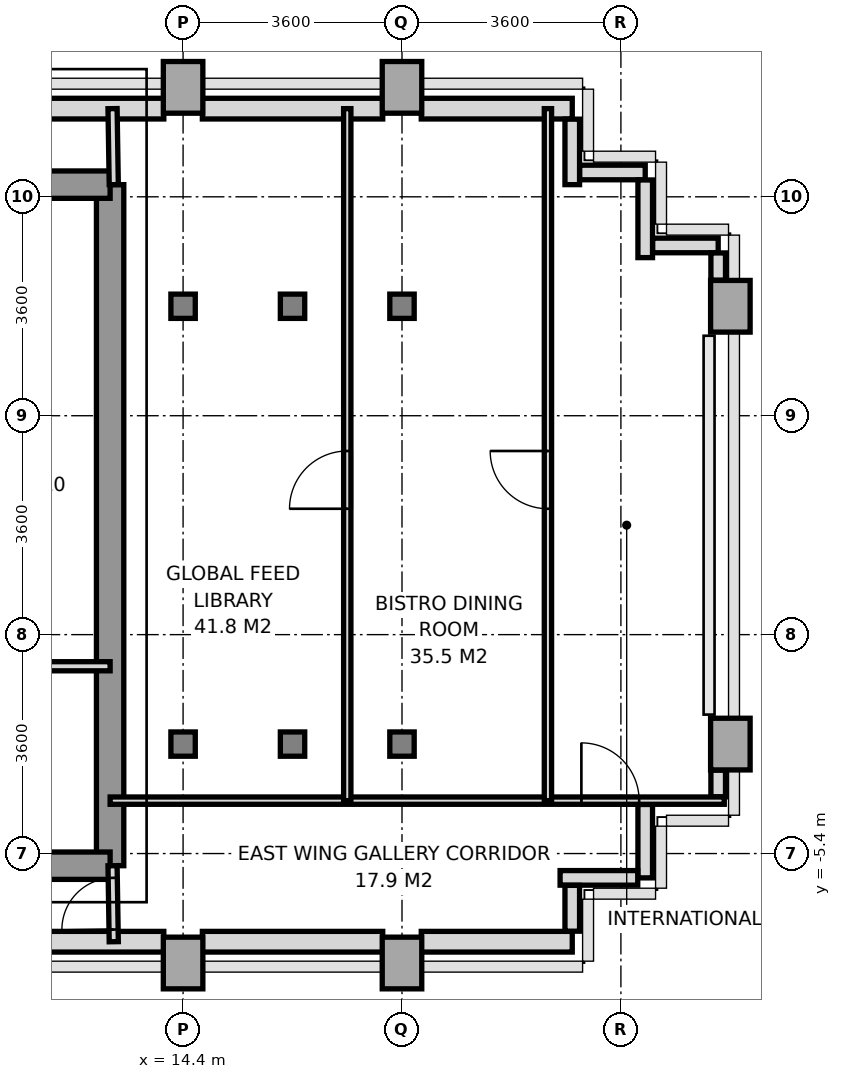
"""IFC4 building model, lengths in metres.
Left out: names, types, materials, properties, quantities, classifications, styles, units other than length and angle.
Written with IfcOpenShell. Run it as: python <this file> out.ifc"""

import sys

from ifc_helpers import new_model, si_unit, direction, frame, frame_2d, origin, origin_2d, place, context, subcontext, project, spatial, rectangle, i_section, extrude, source, transform, mapped, element, fill, save


model = new_model("IFC4")
c1 = context("Model", 3, precision=1e-05, world=origin(), true_north=direction((0.0, 1.0)))
c2 = subcontext(c1, "Body", "Model", "MODEL_VIEW")
j1 = project(units=[si_unit("LENGTHUNIT", "METRE"), si_unit("PLANEANGLEUNIT", "RADIAN")], contexts=[c1])
p1 = place(None, origin())
s1 = spatial("IfcSite", under=j1, at=p1, CompositionType="ELEMENT")
p2 = place(p1, origin())
s2 = spatial("IfcBuilding", under=s1, at=p2, CompositionType="ELEMENT")
p3 = place(p2, frame((0.0, 0.0, 117.6)))
s3 = spatial("IfcBuildingStorey", under=s2, at=p3, CompositionType="ELEMENT", Elevation=117.6)
m1 = source(origin(), c2, "Body", "SweptSolid", [
    extrude(rectangle(XDim=0.65, YDim=0.85, at=origin_2d()), origin(), (0.0, 0.0, 1.0), 3.2),
])
p4 = place(p3, frame((14.4, -7.2, 0.0), z_axis=(0.0, 0.0, 1.0), x_axis=(1.0, 0.0, 0.0)))
e1 = element("IfcColumn", 1, at=p4, inside=s3, PredefinedType="COLUMN", context=c2, shape_type="MappedRepresentation", body=[
    mapped(m1, transform((0.0, 0.0, 0.0), x_axis=(1.0, 0.0, 0.0), y_axis=(0.0, 1.0, 0.0), z_axis=(0.0, 0.0, 1.0), scale=1.0)),
])
m2 = source(origin(), c2, "Body", "SweptSolid", [
    extrude(i_section(OverallWidth=0.401, OverallDepth=0.399, WebThickness=0.02, FlangeThickness=0.032, at=origin_2d()), origin(), (0.0, 0.0, 1.0), 3.2),
])
for number, where, z_axis, x_axis in (
    (2, (14.4, -3.6, 0.0), (0.0, 0.0, 1.0), (1.0, 0.0, 0.0)),
    (3, (14.4, 3.6, 0.0), (0.0, 0.0, 1.0), (1.0, 0.0, 0.0)),
):
    element("IfcColumn", number, at=place(p3, frame(where, z_axis=z_axis, x_axis=x_axis)), inside=s3, PredefinedType="COLUMN", context=c2, shape_type="MappedRepresentation", body=[
        mapped(m2, transform((0.0, 0.0, 0.0), x_axis=(1.0, 0.0, 0.0), y_axis=(0.0, 1.0, 0.0), z_axis=(0.0, 0.0, 1.0), scale=1.0)),
    ])
p5 = place(p3, frame((14.4, 7.2, 0.0), z_axis=(0.0, 0.0, 1.0), x_axis=(1.0, 0.0, 0.0)))
e4 = element("IfcColumn", 4, at=p5, inside=s3, PredefinedType="COLUMN", context=c2, shape_type="MappedRepresentation", body=[
    mapped(m1, transform((0.0, 0.0, 0.0), x_axis=(1.0, 0.0, 0.0), y_axis=(0.0, 1.0, 0.0), z_axis=(0.0, 0.0, 1.0), scale=1.0)),
])
for number, where, z_axis, x_axis in (
    (5, (16.2, -3.6, 0.0), (0.0, 0.0, 1.0), (1.0, 0.0, 0.0)),
    (6, (16.2, 3.6, 0.0), (0.0, 0.0, 1.0), (1.0, 0.0, 0.0)),
):
    element("IfcColumn", number, at=place(p3, frame(where, z_axis=z_axis, x_axis=x_axis)), inside=s3, PredefinedType="COLUMN", context=c2, shape_type="MappedRepresentation", body=[
        mapped(m2, transform((0.0, 0.0, 0.0), x_axis=(1.0, 0.0, 0.0), y_axis=(0.0, 1.0, 0.0), z_axis=(0.0, 0.0, 1.0), scale=1.0)),
    ])
p6 = place(p3, frame((18.0, -7.2, 0.0), z_axis=(0.0, 0.0, 1.0), x_axis=(1.0, 0.0, 0.0)))
e7 = element("IfcColumn", 7, at=p6, inside=s3, PredefinedType="COLUMN", context=c2, shape_type="MappedRepresentation", body=[
    mapped(m1, transform((0.0, 0.0, 0.0), x_axis=(1.0, 0.0, 0.0), y_axis=(0.0, 1.0, 0.0), z_axis=(0.0, 0.0, 1.0), scale=1.0)),
])
for number, where, z_axis, x_axis in (
    (8, (18.0, -3.6, 0.0), (0.0, 0.0, 1.0), (1.0, 0.0, 0.0)),
    (9, (18.0, 3.6, 0.0), (0.0, 0.0, 1.0), (1.0, 0.0, 0.0)),
):
    element("IfcColumn", number, at=place(p3, frame(where, z_axis=z_axis, x_axis=x_axis)), inside=s3, PredefinedType="COLUMN", context=c2, shape_type="MappedRepresentation", body=[
        mapped(m2, transform((0.0, 0.0, 0.0), x_axis=(1.0, 0.0, 0.0), y_axis=(0.0, 1.0, 0.0), z_axis=(0.0, 0.0, 1.0), scale=1.0)),
    ])
for number, where, z_axis, x_axis in (
    (10, (18.0, 7.2, 0.0), (0.0, 0.0, 1.0), (1.0, 0.0, 0.0)),
    (11, (23.4, -3.6, 0.0), (0.0, 0.0, 1.0), (1.0, 0.0, 0.0)),
    (12, (23.4, 3.6, 0.0), (0.0, 0.0, 1.0), (1.0, 0.0, 0.0)),
):
    element("IfcColumn", number, at=place(p3, frame(where, z_axis=z_axis, x_axis=x_axis)), inside=s3, PredefinedType="COLUMN", context=c2, shape_type="MappedRepresentation", body=[
        mapped(m1, transform((0.0, 0.0, 0.0), x_axis=(1.0, 0.0, 0.0), y_axis=(0.0, 1.0, 0.0), z_axis=(0.0, 0.0, 1.0), scale=1.0)),
    ])
p7 = place(p3, frame((11.498, 6.85, 0.0), z_axis=(0.0, 0.0, 1.0), x_axis=(1.0, 0.0, 0.0)))
e13 = element("IfcWall", 13, at=p7, inside=s3, PredefinedType="SOLIDWALL", context=c2, shape_type="SweptSolid", body=[
    extrude(rectangle(XDim=2.585, YDim=0.34, at=frame_2d((1.292, 0.0))), origin(), (0.0, 0.0, 1.0), 3.2),
])
p8 = place(p3, frame((14.717, 6.85, 0.0), z_axis=(0.0, 0.0, 1.0), x_axis=(1.0, 0.0, 0.0)))
e14 = element("IfcWall", 14, at=p8, inside=s3, PredefinedType="SOLIDWALL", context=c2, shape_type="SweptSolid", body=[
    extrude(rectangle(XDim=2.966, YDim=0.34, at=frame_2d((1.483, 0.0))), origin(), (0.0, 0.0, 1.0), 2.45),
])
p9 = place(p3, frame((18.317, 6.85, 0.0), z_axis=(0.0, 0.0, 1.0), x_axis=(1.0, 0.0, 0.0)))
e15 = element("IfcWall", 15, at=p9, inside=s3, PredefinedType="SOLIDWALL", context=c2, shape_type="SweptSolid", body=[
    extrude(rectangle(XDim=2.483, YDim=0.34, at=frame_2d((1.242, 0.0))), origin(), (0.0, 0.0, 1.0), 3.2),
])
p10 = place(p3, frame((11.75, -6.85, 0.0), z_axis=(0.0, 0.0, 1.0), x_axis=(1.0, 0.0, 0.0)))
e16 = element("IfcWall", 16, at=p10, inside=s3, PredefinedType="SOLIDWALL", context=c2, shape_type="SweptSolid", body=[
    extrude(rectangle(XDim=2.333, YDim=0.34, at=frame_2d((1.167, 0.0))), origin(), (0.0, 0.0, 1.0), 3.2),
])
p11 = place(p3, frame((14.717, -6.85, 0.0), z_axis=(0.0, 0.0, 1.0), x_axis=(1.0, 0.0, 0.0)))
e17 = element("IfcWall", 17, at=p11, inside=s3, PredefinedType="SOLIDWALL", context=c2, shape_type="SweptSolid", body=[
    extrude(rectangle(XDim=2.966, YDim=0.34, at=frame_2d((1.483, 0.0))), origin(), (0.0, 0.0, 1.0), 2.45),
])
p12 = place(p3, frame((18.317, -6.85, 0.0), z_axis=(0.0, 0.0, 1.0), x_axis=(1.0, 0.0, 0.0)))
e18 = element("IfcWall", 18, at=p12, inside=s3, PredefinedType="SOLIDWALL", context=c2, shape_type="SweptSolid", body=[
    extrude(rectangle(XDim=2.483, YDim=0.34, at=frame_2d((1.242, 0.0))), origin(), (0.0, 0.0, 1.0), 3.2),
])
p13 = place(p3, frame((22.0, -4.593, 0.0), z_axis=(0.0, 0.0, 1.0), x_axis=(0.0, -1.0, 0.0)))
e19 = element("IfcWall", 19, at=p13, inside=s3, PredefinedType="PARAPET", context=c2, shape_type="SweptSolid", body=[
    extrude(rectangle(XDim=1.207, YDim=0.24, at=frame_2d((0.604, 0.0))), origin(), (0.0, 0.0, 1.0), 1.15),
])
p14 = place(p3, frame((21.877, -5.8, 0.0), z_axis=(0.0, 0.0, 1.0), x_axis=(-1.0, 0.0, 0.0)))
e20 = element("IfcWall", 20, at=p14, inside=s3, PredefinedType="PARAPET", context=c2, shape_type="SweptSolid", body=[
    extrude(rectangle(XDim=1.277, YDim=0.24, at=frame_2d((0.638, 0.0))), origin(), (0.0, 0.0, 1.0), 1.15),
])
p15 = place(p3, frame((20.8, -5.923, 0.0), z_axis=(0.0, 0.0, 1.0), x_axis=(0.0, -1.0, 0.0)))
e21 = element("IfcWall", 21, at=p15, inside=s3, PredefinedType="PARAPET", context=c2, shape_type="SweptSolid", body=[
    extrude(rectangle(XDim=0.754, YDim=0.24, at=frame_2d((0.377, 0.0))), origin(), (0.0, 0.0, 1.0), 1.15),
])
for number, where, z_axis, x_axis in (
    (22, (20.8, 6.677, 0.0), (0.0, 0.0, 1.0), (0.0, -1.0, 0.0)),
    (23, (20.923, 5.8, 0.0), (0.0, 0.0, 1.0), (1.0, 0.0, 0.0)),
):
    element("IfcWall", number, at=place(p3, frame(where, z_axis=z_axis, x_axis=x_axis)), inside=s3, PredefinedType="PARAPET", context=c2, shape_type="SweptSolid", body=[
        extrude(rectangle(XDim=1.077, YDim=0.24, at=frame_2d((0.539, 0.0))), origin(), (0.0, 0.0, 1.0), 1.15),
    ])
p16 = place(p3, frame((22.0, 5.677, 0.0), z_axis=(0.0, 0.0, 1.0), x_axis=(0.0, -1.0, 0.0)))
e24 = element("IfcWall", 24, at=p16, inside=s3, PredefinedType="PARAPET", context=c2, shape_type="SweptSolid", body=[
    extrude(rectangle(XDim=1.277, YDim=0.24, at=frame_2d((0.639, 0.0))), origin(), (0.0, 0.0, 1.0), 1.15),
])
p17 = place(p3, frame((22.123, 4.6, 0.0), z_axis=(0.0, 0.0, 1.0), x_axis=(1.0, 0.0, 0.0)))
e25 = element("IfcWall", 25, at=p17, inside=s3, PredefinedType="PARAPET", context=c2, shape_type="SweptSolid", body=[
    extrude(rectangle(XDim=1.077, YDim=0.24, at=frame_2d((0.539, 0.0))), origin(), (0.0, 0.0, 1.0), 1.15),
])
p18 = place(p3, frame((23.2, 4.477, 0.0), z_axis=(0.0, 0.0, 1.0), x_axis=(0.0, -1.0, 0.0)))
e26 = element("IfcWall", 26, at=p18, inside=s3, PredefinedType="PARAPET", context=c2, shape_type="SweptSolid", body=[
    extrude(rectangle(XDim=0.449, YDim=0.24, at=frame_2d((0.225, 0.0))), origin(), (0.0, 0.0, 1.0), 1.15),
])
p19 = place(p3, frame((23.2, -4.028, 0.0), z_axis=(0.0, 0.0, 1.0), x_axis=(0.0, -1.0, 0.0)))
e27 = element("IfcWall", 27, at=p19, inside=s3, PredefinedType="PARAPET", context=c2, shape_type="SweptSolid", body=[
    extrude(rectangle(XDim=0.439, YDim=0.24, at=frame_2d((0.219, 0.0))), origin(), (0.0, 0.0, 1.0), 1.15),
])
p20 = place(p3, frame((13.2, -5.6, 0.0), z_axis=(0.0, 0.0, 1.0), x_axis=(0.0, 1.0, 0.0)))
e28 = element("IfcWall", 28, at=p20, inside=s3, PredefinedType="SHEAR", context=c2, shape_type="SweptSolid", body=[
    extrude(rectangle(XDim=11.2, YDim=0.45, at=frame_2d((5.6, 0.0))), origin(), (0.0, 0.0, 1.0), 3.2),
])
p21 = place(p3, frame((11.381, 5.6, 0.0), z_axis=(0.0, 0.0, 1.0), x_axis=(1.0, 0.0, 0.0)))
e29 = element("IfcWall", 29, at=p21, inside=s3, PredefinedType="SHEAR", context=c2, shape_type="SweptSolid", body=[
    extrude(rectangle(XDim=1.819, YDim=0.45, at=frame_2d((0.909, 0.0))), origin(), (0.0, 0.0, 1.0), 3.2),
])
p22 = place(p3, frame((5.4, -5.6, 0.0), z_axis=(0.0, 0.0, 1.0), x_axis=(1.0, 0.0, 0.0)))
e30 = element("IfcWall", 30, at=p22, inside=s3, PredefinedType="SHEAR", context=c2, shape_type="SweptSolid", body=[
    extrude(rectangle(XDim=7.8, YDim=0.45, at=frame_2d((3.9, 0.0))), origin(), (0.0, 0.0, 1.0), 3.2),
])
p23 = place(p22, frame((3.0, 0.0, 0.0)))
e31 = element("IfcOpeningElement", 31, at=p23, cuts=e30, PredefinedType="OPENING", context=c2, shape_type="SweptSolid", body=[
    extrude(rectangle(XDim=1.2, YDim=2.2, at=frame_2d((0.6, 1.1))), frame((0.0, 0.235, 0.0), z_axis=(0.0, -1.0, 0.0), x_axis=(1.0, 0.0, 0.0)), (0.0, 0.0, 1.0), 0.47),
])
p24 = place(p22, frame((5.85, 0.0, 0.0)))
e32 = element("IfcOpeningElement", 32, at=p24, cuts=e30, PredefinedType="OPENING", context=c2, shape_type="SweptSolid", body=[
    extrude(rectangle(XDim=0.8, YDim=2.1, at=frame_2d((0.4, 1.05))), frame((0.0, 0.235, 0.0), z_axis=(0.0, -1.0, 0.0), x_axis=(1.0, 0.0, 0.0)), (0.0, 0.0, 1.0), 0.47),
])
p25 = place(p3, frame((11.02, -2.32, 0.0), z_axis=(0.0, 0.0, 1.0), x_axis=(1.0, 0.0, 0.0)))
e33 = element("IfcWall", 33, at=p25, inside=s3, PredefinedType="PARTITIONING", context=c2, shape_type="SweptSolid", body=[
    extrude(rectangle(XDim=2.18, YDim=0.15, at=frame_2d((1.09, 0.0))), origin(), (0.0, 0.0, 1.0), 3.2),
])
p26 = place(p3, frame((13.26, 5.6, 0.0), z_axis=(0.0, 0.0, 1.0), x_axis=(-0.016013571389, 0.999871774545, 0.0)))
e34 = element("IfcWall", 34, at=p26, inside=s3, PredefinedType="PARTITIONING", context=c2, shape_type="SweptSolid", body=[
    extrude(rectangle(XDim=1.25, YDim=0.15, at=frame_2d((0.625, 0.0))), origin(), (0.0, 0.0, 1.0), 3.2),
])
p27 = place(p3, frame((13.26, -6.85, 0.0), z_axis=(0.0, 0.0, 1.0), x_axis=(-0.016013571389, 0.999871774545, 0.0)))
e35 = element("IfcWall", 35, at=p27, inside=s3, PredefinedType="PARTITIONING", context=c2, shape_type="SweptSolid", body=[
    extrude(rectangle(XDim=1.25, YDim=0.15, at=frame_2d((0.625, 0.0))), origin(), (0.0, 0.0, 1.0), 3.2),
])
p28 = place(p27, frame((0.2, 0.0, 0.0)))
e36 = element("IfcOpeningElement", 36, at=p28, cuts=e35, PredefinedType="OPENING", context=c2, shape_type="SweptSolid", body=[
    extrude(rectangle(XDim=0.85, YDim=2.1, at=frame_2d((0.425, 1.05))), frame((0.0, 0.085, 0.0), z_axis=(0.0, -1.0, 0.0), x_axis=(1.0, 0.0, 0.0)), (0.0, 0.0, 1.0), 0.17),
])
p29 = place(p3, frame((13.2, -4.53, 0.0), z_axis=(0.0, 0.0, 1.0), x_axis=(1.0, 0.0, 0.0)))
e37 = element("IfcWall", 37, at=p29, inside=s3, PredefinedType="PARTITIONING", context=c2, shape_type="SweptSolid", body=[
    extrude(rectangle(XDim=10.1, YDim=0.12, at=frame_2d((5.05, 0.0))), origin(), (0.0, 0.0, 1.0), 2.76),
])
p30 = place(p29, frame((7.75, 0.0, 0.0)))
e38 = element("IfcOpeningElement", 38, at=p30, cuts=e37, PredefinedType="OPENING", context=c2, shape_type="SweptSolid", body=[
    extrude(rectangle(XDim=0.95, YDim=2.15, at=frame_2d((0.475, 1.075))), frame((0.0, 0.07, 0.0), z_axis=(0.0, -1.0, 0.0), x_axis=(1.0, 0.0, 0.0)), (0.0, 0.0, 1.0), 0.14),
])
p31 = place(p3, frame((17.1, -4.53, 0.0), z_axis=(0.0, 0.0, 1.0), x_axis=(0.0, 1.0, 0.0)))
e39 = element("IfcWall", 39, at=p31, inside=s3, PredefinedType="PARTITIONING", context=c2, shape_type="SweptSolid", body=[
    extrude(rectangle(XDim=11.38, YDim=0.12, at=frame_2d((5.69, 0.0))), origin(), (0.0, 0.0, 1.0), 2.7),
])
p32 = place(p31, frame((4.8, 0.0, 0.0)))
e40 = element("IfcOpeningElement", 40, at=p32, cuts=e39, PredefinedType="OPENING", context=c2, shape_type="SweptSolid", body=[
    extrude(rectangle(XDim=0.95, YDim=2.15, at=frame_2d((0.475, 1.075))), frame((0.0, 0.07, 0.0), z_axis=(0.0, -1.0, 0.0), x_axis=(1.0, 0.0, 0.0)), (0.0, 0.0, 1.0), 0.14),
])
p33 = place(p3, frame((20.4, -4.53, 0.0), z_axis=(0.0, 0.0, 1.0), x_axis=(0.0, 1.0, 0.0)))
e41 = element("IfcWall", 41, at=p33, inside=s3, PredefinedType="PARTITIONING", context=c2, shape_type="SweptSolid", body=[
    extrude(rectangle(XDim=11.38, YDim=0.12, at=frame_2d((5.69, 0.0))), origin(), (0.0, 0.0, 1.0), 2.7),
])
p34 = place(p33, frame((4.8, 0.0, 0.0)))
e42 = element("IfcOpeningElement", 42, at=p34, cuts=e41, PredefinedType="OPENING", context=c2, shape_type="SweptSolid", body=[
    extrude(rectangle(XDim=0.95, YDim=2.15, at=frame_2d((0.475, 1.075))), frame((0.0, 0.07, 0.0), z_axis=(0.0, -1.0, 0.0), x_axis=(1.0, 0.0, 0.0)), (0.0, 0.0, 1.0), 0.14),
])
m3 = source(origin(), c2, "Body", "SweptSolid", [
    extrude(rectangle(XDim=0.85, YDim=2.1, at=frame_2d((0.425, 1.05))), frame((0.0, 0.025, 0.0), z_axis=(0.0, -1.0, 0.0), x_axis=(1.0, 0.0, 0.0)), (0.0, 0.0, 1.0), 0.05),
])
p35 = place(p28, origin())
e43 = element("IfcDoor", 43, at=p35, inside=s3, OperationType="SINGLE_SWING_LEFT", PredefinedType="DOOR", context=c2, shape_type="MappedRepresentation", body=[
    mapped(m3, transform((0.0, 0.0, 0.0), x_axis=(1.0, 0.0, 0.0), y_axis=(0.0, 1.0, 0.0), z_axis=(0.0, 0.0, 1.0), scale=1.0)),
])
fill(e36, e43)
m4 = source(origin(), c2, "Body", "SweptSolid", [
    extrude(rectangle(XDim=0.95, YDim=2.15, at=frame_2d((0.475, 1.075))), frame((0.0, 0.025, 0.0), z_axis=(0.0, -1.0, 0.0), x_axis=(1.0, 0.0, 0.0)), (0.0, 0.0, 1.0), 0.05),
])
p36 = place(p32, origin())
e44 = element("IfcDoor", 44, at=p36, inside=s3, OperationType="SINGLE_SWING_LEFT", PredefinedType="DOOR", context=c2, shape_type="MappedRepresentation", body=[
    mapped(m4, transform((0.0, 0.0, 0.0), x_axis=(1.0, 0.0, 0.0), y_axis=(0.0, 1.0, 0.0), z_axis=(0.0, 0.0, 1.0), scale=1.0)),
])
fill(e40, e44)
p37 = place(p34, origin())
e45 = element("IfcDoor", 45, at=p37, inside=s3, OperationType="SINGLE_SWING_RIGHT", PredefinedType="DOOR", context=c2, shape_type="MappedRepresentation", body=[
    mapped(m4, transform((0.0, 0.0, 0.0), x_axis=(1.0, 0.0, 0.0), y_axis=(0.0, 1.0, 0.0), z_axis=(0.0, 0.0, 1.0), scale=1.0)),
])
fill(e42, e45)
p38 = place(p30, origin())
e46 = element("IfcDoor", 46, at=p38, inside=s3, OperationType="SINGLE_SWING_LEFT", PredefinedType="DOOR", context=c2, shape_type="MappedRepresentation", body=[
    mapped(m4, transform((0.0, 0.0, 0.0), x_axis=(1.0, 0.0, 0.0), y_axis=(0.0, 1.0, 0.0), z_axis=(0.0, 0.0, 1.0), scale=1.0)),
])
fill(e38, e46)
save(model, sys.argv[1])
